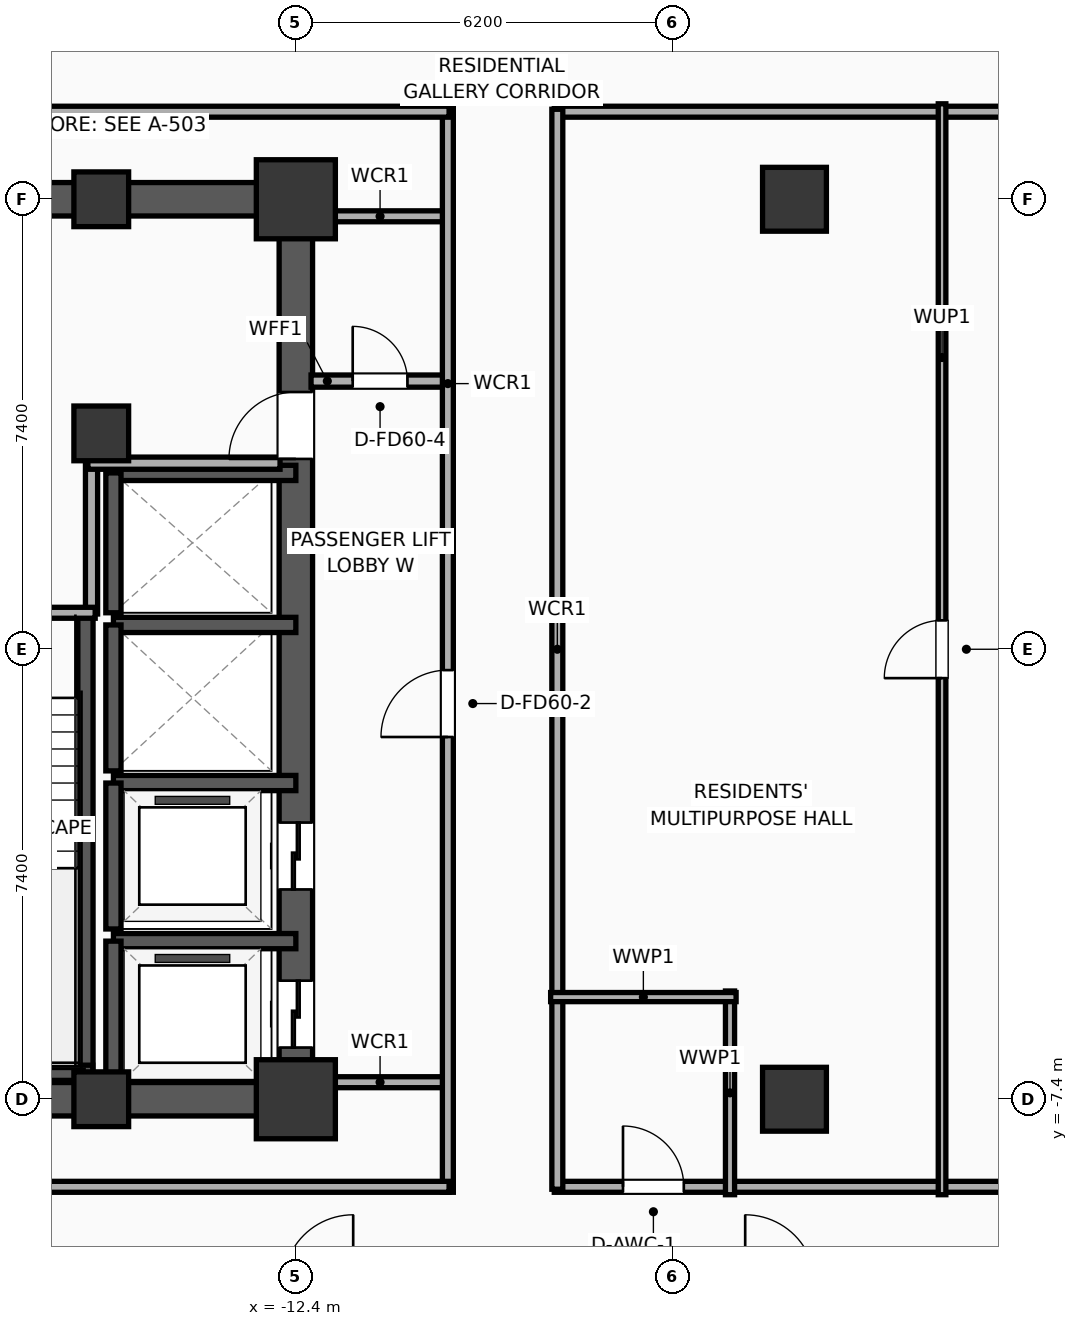
"""IFC4 building model, lengths in metres.
Left out: names, types, materials, properties, quantities, classifications, styles, units other than length and angle.
Written with IfcOpenShell. Run it as: python <this file> out.ifc"""

import sys

from ifc_helpers import new_model, si_unit, direction, frame, frame_2d, origin, origin_2d, place, context, subcontext, project, spatial, rectangle, extrude, element, fill, save


model = new_model("IFC4")
c1 = context("Model", 3, precision=1e-05, world=origin(), true_north=direction((0.0, 1.0)))
c2 = subcontext(c1, "Body", "Model", "MODEL_VIEW")
j1 = project(units=[si_unit("LENGTHUNIT", "METRE"), si_unit("PLANEANGLEUNIT", "RADIAN")], contexts=[c1])
p1 = place(None, origin())
s1 = spatial("IfcSite", under=j1, at=p1, CompositionType="ELEMENT")
p2 = place(p1, origin())
s2 = spatial("IfcBuilding", under=s1, at=p2, CompositionType="ELEMENT")
p3 = place(p2, frame((0.0, 0.0, 93.6)))
s3 = spatial("IfcBuildingStorey", under=s2, at=p3, CompositionType="ELEMENT", Elevation=93.6)
for number, where, z_axis, x_axis in (
    (1, (-15.6, -7.4, 0.0), (0.0, 0.0, 1.0), (1.0, 0.0, 0.0)),
    (2, (-15.6, 7.4, 0.0), (0.0, 0.0, 1.0), (1.0, 0.0, 0.0)),
):
    element("IfcColumn", number, at=place(p3, frame(where, z_axis=z_axis, x_axis=x_axis)), inside=s3, PredefinedType="COLUMN", context=c2, shape_type="SweptSolid", body=[
        extrude(rectangle(XDim=0.9, YDim=0.9, at=origin_2d()), origin(), (0.0, 0.0, 1.0), 3.9),
    ])
p4 = place(p3, frame((-12.4, -7.4, 0.0), z_axis=(0.0, 0.0, 1.0), x_axis=(1.0, 0.0, 0.0)))
e3 = element("IfcColumn", 3, at=p4, inside=s3, PredefinedType="COLUMN", context=c2, shape_type="SweptSolid", body=[
    extrude(rectangle(XDim=1.3, YDim=1.3, at=origin_2d()), origin(), (0.0, 0.0, 1.0), 3.9),
])
p5 = place(p3, frame((-15.6, 3.55, 0.0), z_axis=(0.0, 0.0, 1.0), x_axis=(1.0, 0.0, 0.0)))
e4 = element("IfcColumn", 4, at=p5, inside=s3, PredefinedType="COLUMN", context=c2, shape_type="SweptSolid", body=[
    extrude(rectangle(XDim=0.9, YDim=0.9, at=origin_2d()), origin(), (0.0, 0.0, 1.0), 3.9),
])
p6 = place(p3, frame((-12.4, 7.4, 0.0), z_axis=(0.0, 0.0, 1.0), x_axis=(1.0, 0.0, 0.0)))
e5 = element("IfcColumn", 5, at=p6, inside=s3, PredefinedType="COLUMN", context=c2, shape_type="SweptSolid", body=[
    extrude(rectangle(XDim=1.3, YDim=1.3, at=origin_2d()), origin(), (0.0, 0.0, 1.0), 3.9),
])
for number, where, z_axis, x_axis in (
    (6, (-19.475, -7.4, 0.0), (0.0, 0.0, 1.0), (1.0, 0.0, 0.0)),
    (7, (-19.475, 7.4, 0.0), (0.0, 0.0, 1.0), (1.0, 0.0, 0.0)),
):
    element("IfcWall", number, at=place(p3, frame(where, z_axis=z_axis, x_axis=x_axis)), inside=s3, PredefinedType="SHEAR", context=c2, shape_type="SweptSolid", body=[
        extrude(rectangle(XDim=7.35, YDim=0.55, at=frame_2d((3.675, 0.0))), origin(), (0.0, 0.0, 1.0), 3.65),
    ])
p7 = place(p3, frame((-12.4, -7.4, 0.0), z_axis=(0.0, 0.0, 1.0), x_axis=(0.0, 1.0, 0.0)))
e8 = element("IfcWall", 8, at=p7, inside=s3, PredefinedType="SHEAR", context=c2, shape_type="SweptSolid", body=[
    extrude(rectangle(XDim=14.8, YDim=0.55, at=frame_2d((7.4, 0.0))), origin(), (0.0, 0.0, 1.0), 3.65),
])
p8 = place(p7, frame((0.85, 0.0, 0.0)))
e9 = element("IfcOpeningElement", 9, at=p8, cuts=e8, PredefinedType="OPENING", context=c2, shape_type="SweptSolid", body=[
    extrude(rectangle(XDim=1.1, YDim=2.05, at=frame_2d((0.55, 1.025))), frame((0.0, 0.285, 0.0), z_axis=(0.0, -1.0, 0.0), x_axis=(1.0, 0.0, 0.0)), (0.0, 0.0, 1.0), 0.57),
])
p9 = place(p7, frame((3.45, 0.0, 0.0)))
e10 = element("IfcOpeningElement", 10, at=p9, cuts=e8, PredefinedType="OPENING", context=c2, shape_type="SweptSolid", body=[
    extrude(rectangle(XDim=1.1, YDim=2.05, at=frame_2d((0.55, 1.025))), frame((0.0, 0.285, 0.0), z_axis=(0.0, -1.0, 0.0), x_axis=(1.0, 0.0, 0.0)), (0.0, 0.0, 1.0), 0.57),
])
p10 = place(p7, frame((10.53, 0.0, 0.0)))
e11 = element("IfcOpeningElement", 11, at=p10, cuts=e8, PredefinedType="OPENING", context=c2, shape_type="SweptSolid", body=[
    extrude(rectangle(XDim=1.1, YDim=2.05, at=frame_2d((0.55, 1.025))), frame((0.0, 0.285, 0.0), z_axis=(0.0, -1.0, 0.0), x_axis=(1.0, 0.0, 0.0)), (0.0, 0.0, 1.0), 0.57),
])
p11 = place(p3, frame((-15.86, -7.085, 0.0), z_axis=(0.0, 0.0, 1.0), x_axis=(0.0, 1.0, 0.0)))
e12 = element("IfcWall", 12, at=p11, inside=s3, PredefinedType="SOLIDWALL", context=c2, shape_type="SweptSolid", body=[
    extrude(rectangle(XDim=7.685, YDim=0.25, at=frame_2d((3.843, 0.0))), origin(), (0.0, 0.0, 1.0), 3.65),
])
p12 = place(p3, frame((-19.2, -6.965, 0.0), z_axis=(0.0, 0.0, 1.0), x_axis=(1.0, 0.0, 0.0)))
e13 = element("IfcWall", 13, at=p12, inside=s3, PredefinedType="SOLIDWALL", context=c2, shape_type="SweptSolid", body=[
    extrude(rectangle(XDim=3.46, YDim=0.25, at=frame_2d((1.73, 0.0))), origin(), (0.0, 0.0, 1.0), 3.65),
])
for number, where, z_axis, x_axis in (
    (14, (-4.2, -7.4, 0.0), (0.0, 0.0, 1.0), (1.0, 0.0, 0.0)),
    (15, (-4.2, 7.4, 0.0), (0.0, 0.0, 1.0), (1.0, 0.0, 0.0)),
):
    element("IfcColumn", number, at=place(p3, frame(where, z_axis=z_axis, x_axis=x_axis)), inside=s3, PredefinedType="COLUMN", context=c2, shape_type="SweptSolid", body=[
        extrude(rectangle(XDim=1.05, YDim=1.05, at=origin_2d()), origin(), (0.0, 0.0, 1.0), 3.9),
    ])
p13 = place(p3, frame((-12.4, -4.8, 0.0), z_axis=(0.0, 0.0, 1.0), x_axis=(-1.0, 0.0, 0.0)))
e16 = element("IfcWall", 16, at=p13, inside=s3, PredefinedType="SOLIDWALL", context=c2, shape_type="SweptSolid", body=[
    extrude(rectangle(XDim=3.0, YDim=0.25, at=frame_2d((1.5, 0.0))), origin(), (0.0, 0.0, 1.0), 3.65),
])
p14 = place(p3, frame((-15.4, -4.8, 0.0), z_axis=(0.0, 0.0, 1.0), x_axis=(0.0, -1.0, 0.0)))
e17 = element("IfcWall", 17, at=p14, inside=s3, PredefinedType="SOLIDWALL", context=c2, shape_type="SweptSolid", body=[
    extrude(rectangle(XDim=2.6, YDim=0.25, at=frame_2d((1.3, 0.0))), origin(), (0.0, 0.0, 1.0), 3.65),
])
p15 = place(p3, frame((-12.4, -2.2, 0.0), z_axis=(0.0, 0.0, 1.0), x_axis=(-1.0, 0.0, 0.0)))
e18 = element("IfcWall", 18, at=p15, inside=s3, PredefinedType="SOLIDWALL", context=c2, shape_type="SweptSolid", body=[
    extrude(rectangle(XDim=3.0, YDim=0.25, at=frame_2d((1.5, 0.0))), origin(), (0.0, 0.0, 1.0), 3.65),
])
p16 = place(p3, frame((-15.4, -2.2, 0.0), z_axis=(0.0, 0.0, 1.0), x_axis=(0.0, -1.0, 0.0)))
e19 = element("IfcWall", 19, at=p16, inside=s3, PredefinedType="SOLIDWALL", context=c2, shape_type="SweptSolid", body=[
    extrude(rectangle(XDim=2.4, YDim=0.25, at=frame_2d((1.2, 0.0))), origin(), (0.0, 0.0, 1.0), 3.65),
])
p17 = place(p3, frame((-12.4, 0.4, 0.0), z_axis=(0.0, 0.0, 1.0), x_axis=(-1.0, 0.0, 0.0)))
e20 = element("IfcWall", 20, at=p17, inside=s3, PredefinedType="SOLIDWALL", context=c2, shape_type="SweptSolid", body=[
    extrude(rectangle(XDim=3.0, YDim=0.25, at=frame_2d((1.5, 0.0))), origin(), (0.0, 0.0, 1.0), 3.65),
])
p18 = place(p3, frame((-15.4, 0.4, 0.0), z_axis=(0.0, 0.0, 1.0), x_axis=(0.0, -1.0, 0.0)))
e21 = element("IfcWall", 21, at=p18, inside=s3, PredefinedType="SOLIDWALL", context=c2, shape_type="SweptSolid", body=[
    extrude(rectangle(XDim=2.4, YDim=0.25, at=frame_2d((1.2, 0.0))), origin(), (0.0, 0.0, 1.0), 3.65),
])
p19 = place(p3, frame((-12.4, 2.9, 0.0), z_axis=(0.0, 0.0, 1.0), x_axis=(-1.0, 0.0, 0.0)))
e22 = element("IfcWall", 22, at=p19, inside=s3, PredefinedType="SOLIDWALL", context=c2, shape_type="SweptSolid", body=[
    extrude(rectangle(XDim=3.0, YDim=0.25, at=frame_2d((1.5, 0.0))), origin(), (0.0, 0.0, 1.0), 3.65),
])
p20 = place(p3, frame((-15.4, 2.9, 0.0), z_axis=(0.0, 0.0, 1.0), x_axis=(0.0, -1.0, 0.0)))
e23 = element("IfcWall", 23, at=p20, inside=s3, PredefinedType="SOLIDWALL", context=c2, shape_type="SweptSolid", body=[
    extrude(rectangle(XDim=2.3, YDim=0.25, at=frame_2d((1.15, 0.0))), origin(), (0.0, 0.0, 1.0), 3.65),
])
p21 = place(p3, frame((-15.76, 0.58, 0.0), z_axis=(0.0, 0.0, 1.0), x_axis=(0.0, 1.0, 0.0)))
e24 = element("IfcWall", 24, at=p21, inside=s3, PredefinedType="PARTITIONING", context=c2, shape_type="SweptSolid", body=[
    extrude(rectangle(XDim=2.52, YDim=0.2, at=frame_2d((1.26, 0.0))), origin(), (0.0, 0.0, 1.0), 3.65),
])
p22 = place(p3, frame((-15.82, 3.06, 0.0), z_axis=(0.0, 0.0, 1.0), x_axis=(1.0, 0.0, 0.0)))
e25 = element("IfcWall", 25, at=p22, inside=s3, PredefinedType="PARTITIONING", context=c2, shape_type="SweptSolid", body=[
    extrude(rectangle(XDim=3.16, YDim=0.2, at=frame_2d((1.58, 0.0))), origin(), (0.0, 0.0, 1.0), 3.65),
])
p23 = place(p3, frame((-19.06, 0.6, 0.0), z_axis=(0.0, 0.0, 1.0), x_axis=(1.0, 0.0, 0.0)))
e26 = element("IfcWall", 26, at=p23, inside=s3, PredefinedType="PARTITIONING", context=c2, shape_type="SweptSolid", body=[
    extrude(rectangle(XDim=3.36, YDim=0.18, at=frame_2d((1.68, 0.0))), origin(), (0.0, 0.0, 1.0), 3.65),
])
p24 = place(p23, frame((1.155, 0.0, 0.0)))
e27 = element("IfcOpeningElement", 27, at=p24, cuts=e26, PredefinedType="OPENING", context=c2, shape_type="SweptSolid", body=[
    extrude(rectangle(XDim=1.05, YDim=2.05, at=frame_2d((0.525, 1.025))), frame((0.0, 0.1, 0.0), z_axis=(0.0, -1.0, 0.0), x_axis=(1.0, 0.0, 0.0)), (0.0, 0.0, 1.0), 0.2),
])
p25 = place(p3, frame((-12.15, 4.41, 0.0), z_axis=(0.0, 0.0, 1.0), x_axis=(1.0, 0.0, 0.0)))
e28 = element("IfcWall", 28, at=p25, inside=s3, PredefinedType="PARTITIONING", context=c2, shape_type="SweptSolid", body=[
    extrude(rectangle(XDim=2.27, YDim=0.2, at=frame_2d((1.135, 0.0))), origin(), (0.0, 0.0, 1.0), 3.65),
])
p26 = place(p25, frame((0.685, 0.0, 0.0)))
e29 = element("IfcOpeningElement", 29, at=p26, cuts=e28, PredefinedType="OPENING", context=c2, shape_type="SweptSolid", body=[
    extrude(rectangle(XDim=0.9, YDim=2.05, at=frame_2d((0.45, 1.025))), frame((0.0, 0.11, 0.0), z_axis=(0.0, -1.0, 0.0), x_axis=(1.0, 0.0, 0.0)), (0.0, 0.0, 1.0), 0.22),
])
for number, where, z_axis, x_axis in (
    (30, (-12.15, 7.12, 0.0), (0.0, 0.0, 1.0), (1.0, 0.0, 0.0)),
    (31, (-12.15, -7.12, 0.0), (0.0, 0.0, 1.0), (1.0, 0.0, 0.0)),
):
    element("IfcWall", number, at=place(p3, frame(where, z_axis=z_axis, x_axis=x_axis)), inside=s3, PredefinedType="PARTITIONING", context=c2, shape_type="SweptSolid", body=[
        extrude(rectangle(XDim=2.27, YDim=0.18, at=frame_2d((1.135, 0.0))), origin(), (0.0, 0.0, 1.0), 3.65),
    ])
p27 = place(p3, frame((-9.9, -8.93, 0.0), z_axis=(0.0, 0.0, 1.0), x_axis=(0.0, 1.0, 0.0)))
e32 = element("IfcWall", 32, at=p27, inside=s3, PredefinedType="PARTITIONING", context=c2, shape_type="SweptSolid", body=[
    extrude(rectangle(XDim=17.86, YDim=0.18, at=frame_2d((8.93, 0.0))), origin(), (0.0, 0.0, 1.0), 3.65),
])
p28 = place(p27, frame((7.487, 0.0, 0.0)))
e33 = element("IfcOpeningElement", 33, at=p28, cuts=e32, PredefinedType="OPENING", context=c2, shape_type="SweptSolid", body=[
    extrude(rectangle(XDim=1.1, YDim=2.05, at=frame_2d((0.55, 1.025))), frame((0.0, 0.1, 0.0), z_axis=(0.0, -1.0, 0.0), x_axis=(1.0, 0.0, 0.0)), (0.0, 0.0, 1.0), 0.2),
])
p29 = place(p3, frame((-29.21, 8.84, 0.0), z_axis=(0.0, 0.0, 1.0), x_axis=(1.0, 0.0, 0.0)))
e34 = element("IfcWall", 34, at=p29, inside=s3, PredefinedType="PARTITIONING", context=c2, shape_type="SweptSolid", body=[
    extrude(rectangle(XDim=19.33, YDim=0.18, at=frame_2d((9.665, 0.0))), origin(), (0.0, 0.0, 1.0), 3.65),
])
p30 = place(p29, frame((2.815, 0.0, 0.0)))
e35 = element("IfcOpeningElement", 35, at=p30, cuts=e34, PredefinedType="OPENING", context=c2, shape_type="SweptSolid", body=[
    extrude(rectangle(XDim=1.15, YDim=2.05, at=frame_2d((0.575, 1.025))), frame((0.0, 0.1, 0.0), z_axis=(0.0, -1.0, 0.0), x_axis=(1.0, 0.0, 0.0)), (0.0, 0.0, 1.0), 0.2),
])
p31 = place(p3, frame((-29.21, -8.84, 0.0), z_axis=(0.0, 0.0, 1.0), x_axis=(1.0, 0.0, 0.0)))
e36 = element("IfcWall", 36, at=p31, inside=s3, PredefinedType="PARTITIONING", context=c2, shape_type="SweptSolid", body=[
    extrude(rectangle(XDim=19.33, YDim=0.18, at=frame_2d((9.665, 0.0))), origin(), (0.0, 0.0, 1.0), 3.65),
])
p32 = place(p3, frame((-8.15, 8.84, 0.0), z_axis=(0.0, 0.0, 1.0), x_axis=(1.0, 0.0, 0.0)))
e37 = element("IfcWall", 37, at=p32, inside=s3, PredefinedType="PARTITIONING", context=c2, shape_type="SweptSolid", body=[
    extrude(rectangle(XDim=16.3, YDim=0.18, at=frame_2d((8.15, 0.0))), origin(), (0.0, 0.0, 1.0), 3.65),
])
p33 = place(p32, frame((8.49, 0.0, 0.0)))
e38 = element("IfcOpeningElement", 38, at=p33, cuts=e37, PredefinedType="OPENING", context=c2, shape_type="SweptSolid", body=[
    extrude(rectangle(XDim=0.95, YDim=2.05, at=frame_2d((0.475, 1.025))), frame((0.0, 0.1, 0.0), z_axis=(0.0, -1.0, 0.0), x_axis=(1.0, 0.0, 0.0)), (0.0, 0.0, 1.0), 0.2),
])
p34 = place(p3, frame((-8.15, -8.84, 0.0), z_axis=(0.0, 0.0, 1.0), x_axis=(1.0, 0.0, 0.0)))
e39 = element("IfcWall", 39, at=p34, inside=s3, PredefinedType="PARTITIONING", context=c2, shape_type="SweptSolid", body=[
    extrude(rectangle(XDim=16.3, YDim=0.18, at=frame_2d((8.15, 0.0))), origin(), (0.0, 0.0, 1.0), 3.65),
])
p35 = place(p34, frame((1.13, 0.0, 0.0)))
e40 = element("IfcOpeningElement", 40, at=p35, cuts=e39, PredefinedType="OPENING", context=c2, shape_type="SweptSolid", body=[
    extrude(rectangle(XDim=1.0, YDim=2.05, at=frame_2d((0.5, 1.025))), frame((0.0, 0.1, 0.0), z_axis=(0.0, -1.0, 0.0), x_axis=(1.0, 0.0, 0.0)), (0.0, 0.0, 1.0), 0.2),
])
p36 = place(p34, frame((10.12, 0.0, 0.0)))
e41 = element("IfcOpeningElement", 41, at=p36, cuts=e39, PredefinedType="OPENING", context=c2, shape_type="SweptSolid", body=[
    extrude(rectangle(XDim=0.95, YDim=2.05, at=frame_2d((0.475, 1.025))), frame((0.0, 0.1, 0.0), z_axis=(0.0, -1.0, 0.0), x_axis=(1.0, 0.0, 0.0)), (0.0, 0.0, 1.0), 0.2),
])
p37 = place(p3, frame((-8.1, -8.88, 0.0), z_axis=(0.0, 0.0, 1.0), x_axis=(0.0, 1.0, 0.0)))
e42 = element("IfcWall", 42, at=p37, inside=s3, PredefinedType="PARTITIONING", context=c2, shape_type="SweptSolid", body=[
    extrude(rectangle(XDim=17.76, YDim=0.18, at=frame_2d((8.88, 0.0))), origin(), (0.0, 0.0, 1.0), 3.65),
])
p38 = place(p3, frame((-5.26, -8.97, 0.0), z_axis=(0.0, 0.0, 1.0), x_axis=(0.0, 1.0, 0.0)))
e43 = element("IfcWall", 43, at=p38, inside=s3, PredefinedType="PLUMBINGWALL", context=c2, shape_type="SweptSolid", body=[
    extrude(rectangle(XDim=3.35, YDim=0.15, at=frame_2d((1.675, 0.0))), origin(), (0.0, 0.0, 1.0), 3.65),
])
p39 = place(p3, frame((-8.21, -5.72, 0.0), z_axis=(0.0, 0.0, 1.0), x_axis=(1.0, 0.0, 0.0)))
e44 = element("IfcWall", 44, at=p39, inside=s3, PredefinedType="PLUMBINGWALL", context=c2, shape_type="SweptSolid", body=[
    extrude(rectangle(XDim=3.05, YDim=0.15, at=frame_2d((1.525, 0.0))), origin(), (0.0, 0.0, 1.0), 3.65),
])
p40 = place(p3, frame((-1.773, -8.97, 0.0), z_axis=(0.0, 0.0, 1.0), x_axis=(0.0, 1.0, 0.0)))
e45 = element("IfcWall", 45, at=p40, inside=s3, PredefinedType="PARTITIONING", context=c2, shape_type="SweptSolid", body=[
    extrude(rectangle(XDim=17.94, YDim=0.125, at=frame_2d((8.97, 0.0))), origin(), (0.0, 0.0, 1.0), 3.65),
])
p41 = place(p40, frame((8.495, 0.0, 0.0)))
e46 = element("IfcOpeningElement", 46, at=p41, cuts=e45, PredefinedType="OPENING", context=c2, shape_type="SweptSolid", body=[
    extrude(rectangle(XDim=0.95, YDim=2.05, at=frame_2d((0.475, 1.025))), frame((0.0, 0.073, 0.0), z_axis=(0.0, -1.0, 0.0), x_axis=(1.0, 0.0, 0.0)), (0.0, 0.0, 1.0), 0.145),
])
p42 = place(p8, origin())
e47 = element("IfcDoor", 47, at=p42, inside=s3, OperationType="SLIDING_TO_LEFT", PredefinedType="DOOR", context=c2, shape_type="SweptSolid", body=[
    extrude(rectangle(XDim=1.1, YDim=2.05, at=frame_2d((0.55, 1.025))), frame((0.0, 0.025, 0.0), z_axis=(0.0, -1.0, 0.0), x_axis=(1.0, 0.0, 0.0)), (0.0, 0.0, 1.0), 0.05),
])
fill(e9, e47)
p43 = place(p9, origin())
e48 = element("IfcDoor", 48, at=p43, inside=s3, OperationType="SLIDING_TO_LEFT", PredefinedType="DOOR", context=c2, shape_type="SweptSolid", body=[
    extrude(rectangle(XDim=1.1, YDim=2.05, at=frame_2d((0.55, 1.025))), frame((0.0, 0.025, 0.0), z_axis=(0.0, -1.0, 0.0), x_axis=(1.0, 0.0, 0.0)), (0.0, 0.0, 1.0), 0.05),
])
fill(e10, e48)
p44 = place(p26, origin())
e49 = element("IfcDoor", 49, at=p44, inside=s3, OperationType="SINGLE_SWING_LEFT", PredefinedType="DOOR", context=c2, shape_type="SweptSolid", body=[
    extrude(rectangle(XDim=0.9, YDim=2.05, at=frame_2d((0.45, 1.025))), frame((0.0, 0.025, 0.0), z_axis=(0.0, -1.0, 0.0), x_axis=(1.0, 0.0, 0.0)), (0.0, 0.0, 1.0), 0.05),
])
fill(e29, e49)
p45 = place(p28, origin())
e50 = element("IfcDoor", 50, at=p45, inside=s3, OperationType="SINGLE_SWING_LEFT", PredefinedType="DOOR", context=c2, shape_type="SweptSolid", body=[
    extrude(rectangle(XDim=1.1, YDim=2.05, at=frame_2d((0.55, 1.025))), frame((0.0, 0.025, 0.0), z_axis=(0.0, -1.0, 0.0), x_axis=(1.0, 0.0, 0.0)), (0.0, 0.0, 1.0), 0.05),
])
fill(e33, e50)
p46 = place(p35, origin())
e51 = element("IfcDoor", 51, at=p46, inside=s3, OperationType="SINGLE_SWING_LEFT", PredefinedType="DOOR", context=c2, shape_type="SweptSolid", body=[
    extrude(rectangle(XDim=1.0, YDim=2.05, at=frame_2d((0.5, 1.025))), frame((0.0, 0.025, 0.0), z_axis=(0.0, -1.0, 0.0), x_axis=(1.0, 0.0, 0.0)), (0.0, 0.0, 1.0), 0.05),
])
fill(e40, e51)
p47 = place(p41, origin())
e52 = element("IfcDoor", 52, at=p47, inside=s3, OperationType="SINGLE_SWING_LEFT", PredefinedType="DOOR", context=c2, shape_type="SweptSolid", body=[
    extrude(rectangle(XDim=0.95, YDim=2.05, at=frame_2d((0.475, 1.025))), frame((0.0, 0.025, 0.0), z_axis=(0.0, -1.0, 0.0), x_axis=(1.0, 0.0, 0.0)), (0.0, 0.0, 1.0), 0.05),
])
fill(e46, e52)
p48 = place(p10, origin())
e53 = element("IfcDoor", 53, at=p48, inside=s3, OperationType="SINGLE_SWING_LEFT", PredefinedType="DOOR", context=c2, shape_type="SweptSolid", body=[
    extrude(rectangle(XDim=1.1, YDim=2.05, at=frame_2d((0.55, 1.025))), frame((0.0, 0.025, 0.0), z_axis=(0.0, -1.0, 0.0), x_axis=(1.0, 0.0, 0.0)), (0.0, 0.0, 1.0), 0.05),
])
fill(e11, e53)
save(model, sys.argv[1])
